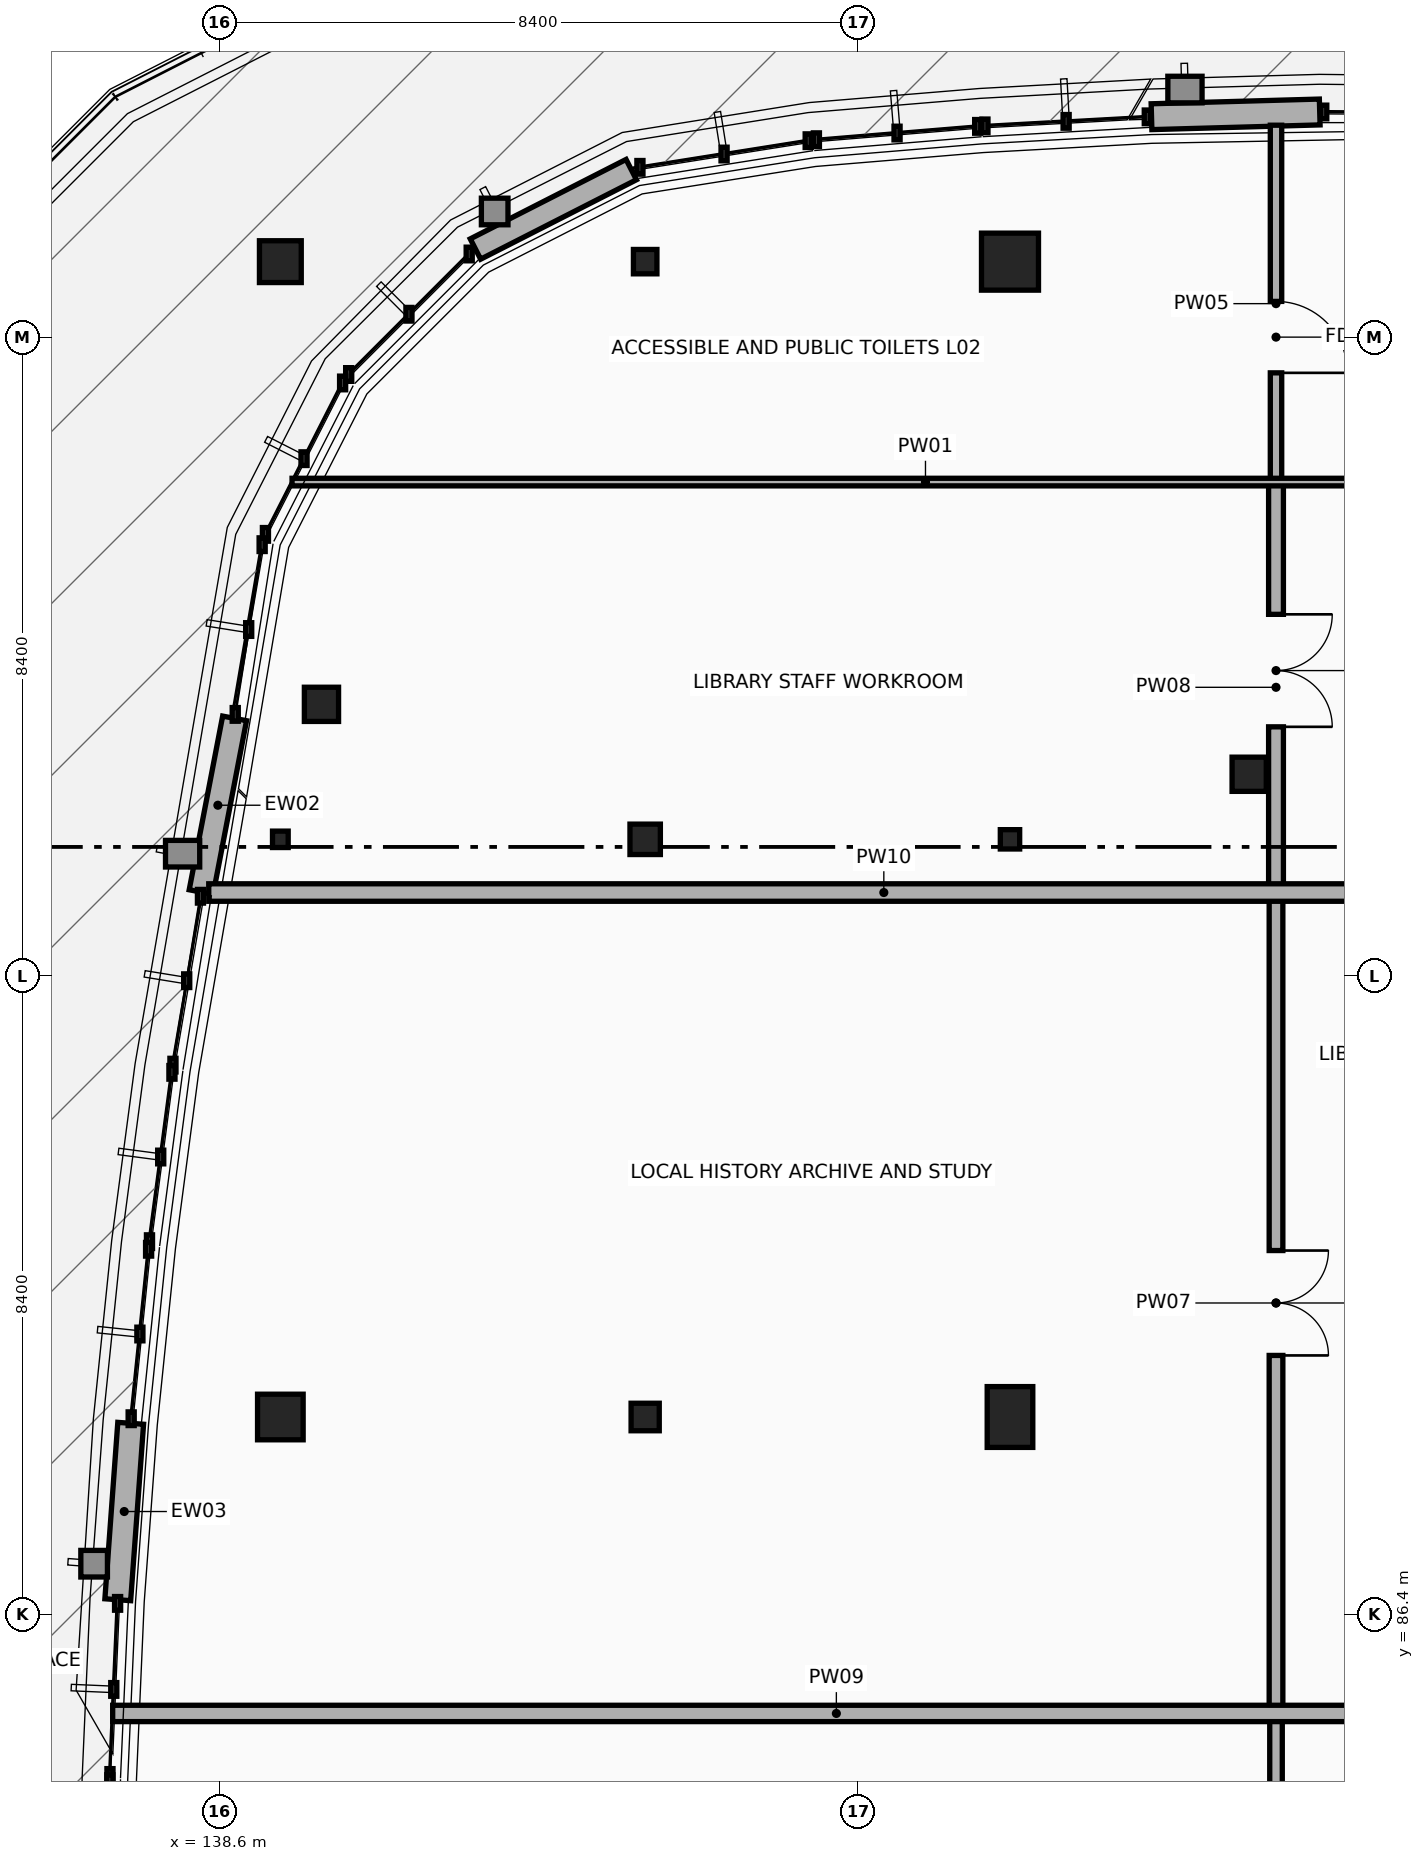
"""IFC4 building model, lengths in metres.
Left out: names, types, materials, properties, quantities, classifications, styles, units other than length and angle.
Written with IfcOpenShell. Run it as: python <this file> out.ifc"""

import sys

from ifc_helpers import new_model, si_unit, direction, frame, frame_2d, origin, origin_2d, place, context, subcontext, project, spatial, rectangle, i_section, extrude, element, fill, save


model = new_model("IFC4")
c1 = context("Model", 3, precision=1e-05, world=origin(), true_north=direction((0.0, 1.0)))
c2 = subcontext(c1, "Body", "Model", "MODEL_VIEW")
j1 = project(units=[si_unit("LENGTHUNIT", "METRE"), si_unit("PLANEANGLEUNIT", "RADIAN")], contexts=[c1])
p1 = place(None, origin())
s1 = spatial("IfcSite", under=j1, at=p1, CompositionType="ELEMENT")
p2 = place(p1, origin())
s2 = spatial("IfcBuilding", under=s1, at=p2, CompositionType="ELEMENT")
p3 = place(p2, frame((0.0, 0.0, 8.7)))
s3 = spatial("IfcBuildingStorey", under=s2, at=p3, CompositionType="ELEMENT", Elevation=8.7)
p4 = place(p3, frame((139.4, 89.0, 0.0), z_axis=(0.0, 0.0, 1.0), x_axis=(1.0, 0.0, 0.0)))
e1 = element("IfcColumn", 1, at=p4, inside=s3, PredefinedType="COLUMN", context=c2, shape_type="SweptSolid", body=[
    extrude(rectangle(XDim=0.6, YDim=0.6, at=origin_2d()), origin(), (0.0, 0.0, 1.0), 3.9),
])
p5 = place(p3, frame((139.4, 96.6, 0.0), z_axis=(0.0, 0.0, 1.0), x_axis=(1.0, 0.0, 0.0)))
e2 = element("IfcColumn", 2, at=p5, inside=s3, PredefinedType="COLUMN", context=c2, shape_type="SweptSolid", body=[
    extrude(i_section(OverallWidth=0.206, OverallDepth=0.216, WebThickness=0.01, FlangeThickness=0.017, at=origin_2d()), origin(), (0.0, 0.0, 1.0), 3.9),
])
p6 = place(p3, frame((139.4, 104.2, 0.0), z_axis=(0.0, 0.0, 1.0), x_axis=(1.0, 0.0, 0.0)))
e3 = element("IfcColumn", 3, at=p6, inside=s3, PredefinedType="COLUMN", context=c2, shape_type="SweptSolid", body=[
    extrude(rectangle(XDim=0.55, YDim=0.55, at=origin_2d()), origin(), (0.0, 0.0, 1.0), 3.9),
])
p7 = place(p3, frame((144.2, 89.0, 0.0), z_axis=(0.0, 0.0, 1.0), x_axis=(1.0, 0.0, 0.0)))
e4 = element("IfcColumn", 4, at=p7, inside=s3, PredefinedType="COLUMN", context=c2, shape_type="SweptSolid", body=[
    extrude(i_section(OverallWidth=0.371, OverallDepth=0.362, WebThickness=0.012, FlangeThickness=0.021, at=origin_2d()), origin(), (0.0, 0.0, 1.0), 3.9),
])
p8 = place(p3, frame((144.2, 96.6, 0.0), z_axis=(0.0, 0.0, 1.0), x_axis=(1.0, 0.0, 0.0)))
e5 = element("IfcColumn", 5, at=p8, inside=s3, PredefinedType="COLUMN", context=c2, shape_type="SweptSolid", body=[
    extrude(rectangle(XDim=0.4, YDim=0.4, at=origin_2d()), origin(), (0.0, 0.0, 1.0), 3.9),
])
p9 = place(p3, frame((144.2, 104.2, 0.0), z_axis=(0.0, 0.0, 1.0), x_axis=(1.0, 0.0, 0.0)))
e6 = element("IfcColumn", 6, at=p9, inside=s3, PredefinedType="COLUMN", context=c2, shape_type="SweptSolid", body=[
    extrude(i_section(OverallWidth=0.309, OverallDepth=0.321, WebThickness=0.014, FlangeThickness=0.022, at=origin_2d()), origin(), (0.0, 0.0, 1.0), 3.9),
])
p10 = place(p3, frame((149.0, 89.0, 0.0), z_axis=(0.0, 0.0, 1.0), x_axis=(1.0, 0.0, 0.0)))
e7 = element("IfcColumn", 7, at=p10, inside=s3, PredefinedType="COLUMN", context=c2, shape_type="SweptSolid", body=[
    extrude(rectangle(XDim=0.6, YDim=0.8, at=origin_2d()), origin(), (0.0, 0.0, 1.0), 3.9),
])
p11 = place(p3, frame((149.0, 96.6, 0.0), z_axis=(0.0, 0.0, 1.0), x_axis=(1.0, 0.0, 0.0)))
e8 = element("IfcColumn", 8, at=p11, inside=s3, PredefinedType="COLUMN", context=c2, shape_type="SweptSolid", body=[
    extrude(i_section(OverallWidth=0.255, OverallDepth=0.254, WebThickness=0.009, FlangeThickness=0.014, at=origin_2d()), origin(), (0.0, 0.0, 1.0), 3.9),
])
p12 = place(p3, frame((149.0, 104.2, 0.0), z_axis=(0.0, 0.0, 1.0), x_axis=(1.0, 0.0, 0.0)))
e9 = element("IfcColumn", 9, at=p12, inside=s3, PredefinedType="COLUMN", context=c2, shape_type="SweptSolid", body=[
    extrude(rectangle(XDim=0.75, YDim=0.75, at=origin_2d()), origin(), (0.0, 0.0, 1.0), 3.9),
])
p13 = place(p3, frame((139.941, 98.376, 0.0), z_axis=(0.0, 0.0, 1.0), x_axis=(1.0, 0.0, 0.0)))
e10 = element("IfcColumn", 10, at=p13, inside=s3, PredefinedType="COLUMN", context=c2, shape_type="SweptSolid", body=[
    extrude(rectangle(XDim=0.45, YDim=0.45, at=origin_2d()), origin(), (0.0, 0.0, 1.0), 3.653),
])
p14 = place(p3, frame((152.147, 97.456, 0.0), z_axis=(0.0, 0.0, 1.0), x_axis=(1.0, 0.0, 0.0)))
e11 = element("IfcColumn", 11, at=p14, inside=s3, PredefinedType="COLUMN", context=c2, shape_type="SweptSolid", body=[
    extrude(rectangle(XDim=0.45, YDim=0.45, at=origin_2d()), origin(), (0.0, 0.0, 1.0), 3.9),
])
p15 = place(p3, frame((150.862, 106.107, 0.0), z_axis=(0.0, 0.0, 1.0), x_axis=(0.999607588296, 0.028011951393, 0.0)))
e12 = element("IfcWall", 12, at=p15, inside=s3, PredefinedType="STANDARD", context=c2, shape_type="SweptSolid", body=[
    extrude(rectangle(XDim=2.214, YDim=0.34, at=frame_2d((1.107, 0.0))), origin(), (0.0, 0.0, 1.0), 3.637),
])
p16 = place(p3, frame((141.967, 104.366, 0.0), z_axis=(0.0, 0.0, 1.0), x_axis=(0.890941500863, 0.454118092615, 0.0)))
e13 = element("IfcWall", 13, at=p16, inside=s3, PredefinedType="STANDARD", context=c2, shape_type="SweptSolid", body=[
    extrude(rectangle(XDim=2.301, YDim=0.3, at=frame_2d((1.15, 0.0))), origin(), (0.0, 0.0, 1.0), 2.945),
])
p17 = place(p3, frame((138.358, 95.906, 0.0), z_axis=(0.0, 0.0, 1.0), x_axis=(0.189170374732, 0.981944280152, 0.0)))
e14 = element("IfcWall", 14, at=p17, inside=s3, PredefinedType="STANDARD", context=c2, shape_type="SweptSolid", body=[
    extrude(rectangle(XDim=2.327, YDim=0.32, at=frame_2d((1.164, 0.0))), origin(), (0.0, 0.0, 1.0), 3.637),
])
p18 = place(p3, frame((137.261, 86.596, 0.0), z_axis=(0.0, 0.0, 1.0), x_axis=(0.073013813712, 0.997330929535, 0.0)))
e15 = element("IfcWall", 15, at=p18, inside=s3, PredefinedType="STANDARD", context=c2, shape_type="SweptSolid", body=[
    extrude(rectangle(XDim=2.327, YDim=0.34, at=frame_2d((1.164, 0.0))), origin(), (0.0, 0.0, 1.0), 3.637),
])
p19 = place(p3, frame((152.5, 85.1, 0.0), z_axis=(0.0, 0.0, 1.0), x_axis=(0.0, -1.0, 0.0)))
e16 = element("IfcWall", 16, at=p19, inside=s3, PredefinedType="PARTITIONING", context=c2, shape_type="SweptSolid", body=[
    extrude(rectangle(XDim=13.0, YDim=0.165, at=frame_2d((6.5, 0.0))), origin(), (0.0, 0.0, 1.0), 3.03),
])
p20 = place(p19, frame((6.03, 0.0, 0.0)))
e17 = element("IfcOpeningElement", 17, at=p20, cuts=e16, PredefinedType="OPENING", context=c2, shape_type="SweptSolid", body=[
    extrude(rectangle(XDim=0.94, YDim=2.1, at=frame_2d((0.47, 1.05))), frame((0.0, 0.093, 0.0), z_axis=(0.0, -1.0, 0.0), x_axis=(1.0, 0.0, 0.0)), (0.0, 0.0, 1.0), 0.185),
])
p21 = place(p3, frame((152.5, 95.9, 0.0), z_axis=(0.0, 0.0, 1.0), x_axis=(0.0, -1.0, 0.0)))
e18 = element("IfcWall", 18, at=p21, inside=s3, PredefinedType="PARTITIONING", context=c2, shape_type="SweptSolid", body=[
    extrude(rectangle(XDim=10.8, YDim=0.18, at=frame_2d((5.4, 0.0))), origin(), (0.0, 0.0, 1.0), 3.105),
])
p22 = place(p21, frame((4.71, 0.0, 0.0)))
e19 = element("IfcOpeningElement", 19, at=p22, cuts=e18, PredefinedType="OPENING", context=c2, shape_type="SweptSolid", body=[
    extrude(rectangle(XDim=1.38, YDim=2.2, at=frame_2d((0.69, 1.1))), frame((0.0, 0.1, 0.0), z_axis=(0.0, -1.0, 0.0), x_axis=(1.0, 0.0, 0.0)), (0.0, 0.0, 1.0), 0.2),
])
p23 = place(p3, frame((152.5, 101.3, 0.0), z_axis=(0.0, 0.0, 1.0), x_axis=(0.0, -1.0, 0.0)))
e20 = element("IfcWall", 20, at=p23, inside=s3, PredefinedType="PARTITIONING", context=c2, shape_type="SweptSolid", body=[
    extrude(rectangle(XDim=5.4, YDim=0.195, at=frame_2d((2.7, 0.0))), origin(), (0.0, 0.0, 1.0), 2.868),
])
p24 = place(p23, frame((1.74, 0.0, 0.0)))
e21 = element("IfcOpeningElement", 21, at=p24, cuts=e20, PredefinedType="OPENING", context=c2, shape_type="SweptSolid", body=[
    extrude(rectangle(XDim=1.48, YDim=2.22, at=frame_2d((0.74, 1.11))), frame((0.0, 0.107, 0.0), z_axis=(0.0, -1.0, 0.0), x_axis=(1.0, 0.0, 0.0)), (0.0, 0.0, 1.0), 0.215),
])
p25 = place(p3, frame((152.5, 105.995, 0.0), z_axis=(0.0, 0.0, 1.0), x_axis=(0.0, -1.0, 0.0)))
e22 = element("IfcWall", 22, at=p25, inside=s3, PredefinedType="PARTITIONING", context=c2, shape_type="SweptSolid", body=[
    extrude(rectangle(XDim=4.695, YDim=0.15, at=frame_2d((2.348, 0.0))), origin(), (0.0, 0.0, 1.0), 3.18),
])
p26 = place(p25, frame((2.318, 0.0, 0.0)))
e23 = element("IfcOpeningElement", 23, at=p26, cuts=e22, PredefinedType="OPENING", context=c2, shape_type="SweptSolid", body=[
    extrude(rectangle(XDim=0.94, YDim=2.1, at=frame_2d((0.47, 1.05))), frame((0.0, 0.085, 0.0), z_axis=(0.0, -1.0, 0.0), x_axis=(1.0, 0.0, 0.0)), (0.0, 0.0, 1.0), 0.17),
])
p27 = place(p3, frame((137.194, 85.1, 0.0), z_axis=(0.0, 0.0, 1.0), x_axis=(1.0, 0.0, 0.0)))
e24 = element("IfcWall", 24, at=p27, inside=s3, PredefinedType="PARTITIONING", context=c2, shape_type="SweptSolid", body=[
    extrude(rectangle(XDim=19.043, YDim=0.215, at=frame_2d((9.521, 0.0))), origin(), (0.0, 0.0, 1.0), 2.868),
])
p28 = place(p3, frame((138.458, 95.9, 0.0), z_axis=(0.0, 0.0, 1.0), x_axis=(1.0, 0.0, 0.0)))
e25 = element("IfcWall", 25, at=p28, inside=s3, PredefinedType="PARTITIONING", context=c2, shape_type="SweptSolid", body=[
    extrude(rectangle(XDim=17.764, YDim=0.23, at=frame_2d((8.882, 0.0))), origin(), (0.0, 0.0, 1.0), 3.022),
])
p29 = place(p3, frame((139.554, 101.3, 0.0), z_axis=(0.0, 0.0, 1.0), x_axis=(1.0, 0.0, 0.0)))
e26 = element("IfcWall", 26, at=p29, inside=s3, PredefinedType="PARTITIONING", context=c2, shape_type="SweptSolid", body=[
    extrude(rectangle(XDim=16.668, YDim=0.1, at=frame_2d((8.334, 0.0))), origin(), (0.0, 0.0, 1.0), 3.017),
])
p30 = place(p22, origin())
e27 = element("IfcDoor", 27, at=p30, inside=s3, OperationType="DOUBLE_DOOR_SINGLE_SWING", PredefinedType="DOOR", context=c2, shape_type="SweptSolid", body=[
    extrude(rectangle(XDim=1.38, YDim=2.2, at=frame_2d((0.69, 1.1))), frame((0.0, 0.025, 0.0), z_axis=(0.0, -1.0, 0.0), x_axis=(1.0, 0.0, 0.0)), (0.0, 0.0, 1.0), 0.05),
])
fill(e19, e27)
p31 = place(p24, origin())
e28 = element("IfcDoor", 28, at=p31, inside=s3, OperationType="DOUBLE_DOOR_SINGLE_SWING", PredefinedType="DOOR", context=c2, shape_type="SweptSolid", body=[
    extrude(rectangle(XDim=1.48, YDim=2.22, at=frame_2d((0.74, 1.11))), frame((0.0, 0.025, 0.0), z_axis=(0.0, -1.0, 0.0), x_axis=(1.0, 0.0, 0.0)), (0.0, 0.0, 1.0), 0.05),
])
fill(e21, e28)
p32 = place(p26, origin())
e29 = element("IfcDoor", 29, at=p32, inside=s3, OperationType="SINGLE_SWING_RIGHT", PredefinedType="DOOR", context=c2, shape_type="SweptSolid", body=[
    extrude(rectangle(XDim=0.94, YDim=2.1, at=frame_2d((0.47, 1.05))), frame((0.0, 0.025, 0.0), z_axis=(0.0, -1.0, 0.0), x_axis=(1.0, 0.0, 0.0)), (0.0, 0.0, 1.0), 0.05),
])
fill(e23, e29)
save(model, sys.argv[1])
